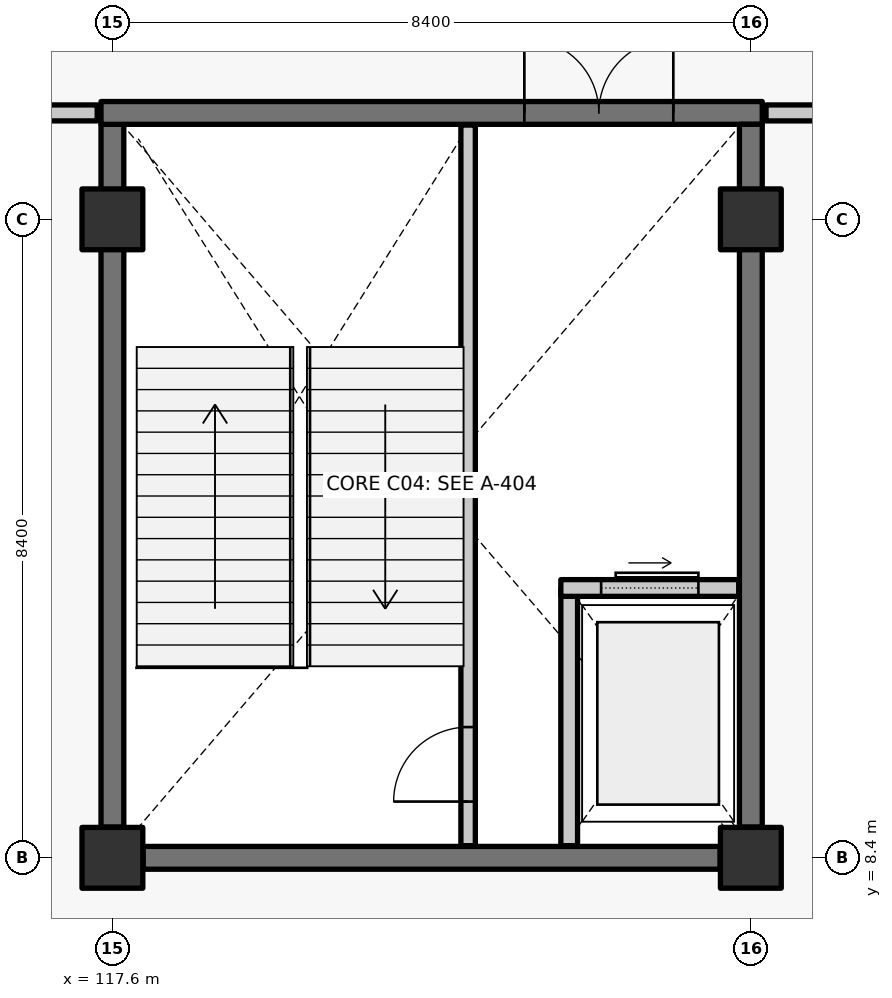
"""IFC4 building model, lengths in metres.
Left out: names, types, materials, properties, quantities, classifications, styles, units other than length and angle.
Written with IfcOpenShell. Run it as: python <this file> out.ifc"""

import sys

from ifc_helpers import new_model, si_unit, direction, frame, frame_2d, origin, origin_2d, place, context, subcontext, project, spatial, rectangle, extrude, element, fill, save


model = new_model("IFC4")
c1 = context("Model", 3, precision=1e-05, world=origin(), true_north=direction((0.0, 1.0)))
c2 = subcontext(c1, "Body", "Model", "MODEL_VIEW")
j1 = project(units=[si_unit("LENGTHUNIT", "METRE"), si_unit("PLANEANGLEUNIT", "RADIAN")], contexts=[c1])
p1 = place(None, origin())
s1 = spatial("IfcSite", under=j1, at=p1, CompositionType="ELEMENT")
p2 = place(p1, origin())
s2 = spatial("IfcBuilding", under=s1, at=p2, CompositionType="ELEMENT")
p3 = place(p2, frame((0.0, 0.0, 6.0)))
s3 = spatial("IfcBuildingStorey", under=s2, at=p3, CompositionType="ELEMENT", Elevation=6.0)
for number, where, z_axis, x_axis in (
    (1, (117.6, 8.4, 0.0), (0.0, 0.0, 1.0), (1.0, 0.0, 0.0)),
    (2, (117.6, 16.8, 0.0), (0.0, 0.0, 1.0), (1.0, 0.0, 0.0)),
    (3, (126.0, 8.4, 0.0), (0.0, 0.0, 1.0), (1.0, 0.0, 0.0)),
    (4, (126.0, 16.8, 0.0), (0.0, 0.0, 1.0), (1.0, 0.0, 0.0)),
):
    element("IfcColumn", number, at=place(p3, frame(where, z_axis=z_axis, x_axis=x_axis)), inside=s3, PredefinedType="COLUMN", context=c2, shape_type="SweptSolid", body=[
        extrude(rectangle(XDim=0.8, YDim=0.8, at=origin_2d()), origin(), (0.0, 0.0, 1.0), 5.4),
    ])
p4 = place(p3, frame((125.595, 8.4, 0.0), z_axis=(0.0, 0.0, 1.0), x_axis=(-1.0, 0.0, 0.0)))
e5 = element("IfcWall", 5, at=p4, inside=s3, PredefinedType="SHEAR", context=c2, shape_type="SweptSolid", body=[
    extrude(rectangle(XDim=7.59, YDim=0.3, at=frame_2d((3.795, 0.0))), origin(), (0.0, 0.0, 1.0), 5.12),
])
p5 = place(p3, frame((117.6, 8.805, 0.0), z_axis=(0.0, 0.0, 1.0), x_axis=(0.0, 1.0, 0.0)))
e6 = element("IfcWall", 6, at=p5, inside=s3, PredefinedType="SHEAR", context=c2, shape_type="SweptSolid", body=[
    extrude(rectangle(XDim=9.245, YDim=0.3, at=frame_2d((4.623, 0.0))), origin(), (0.0, 0.0, 1.0), 5.12),
])
p6 = place(p3, frame((117.45, 18.2, 0.0), z_axis=(0.0, 0.0, 1.0), x_axis=(1.0, 0.0, 0.0)))
e7 = element("IfcWall", 7, at=p6, inside=s3, PredefinedType="SHEAR", context=c2, shape_type="SweptSolid", body=[
    extrude(rectangle(XDim=8.7, YDim=0.3, at=frame_2d((4.35, 0.0))), origin(), (0.0, 0.0, 1.0), 5.12),
])
p7 = place(p6, frame((5.57, 0.0, 0.0)))
e8 = element("IfcOpeningElement", 8, at=p7, cuts=e7, PredefinedType="OPENING", context=c2, shape_type="SweptSolid", body=[
    extrude(rectangle(XDim=1.96, YDim=2.2, at=frame_2d((0.98, 1.1))), frame((0.0, 0.16, 0.0), z_axis=(0.0, -1.0, 0.0), x_axis=(1.0, 0.0, 0.0)), (0.0, 0.0, 1.0), 0.32),
])
p8 = place(p3, frame((126.0, 18.05, 0.0), z_axis=(0.0, 0.0, 1.0), x_axis=(0.0, -1.0, 0.0)))
e9 = element("IfcWall", 9, at=p8, inside=s3, PredefinedType="SHEAR", context=c2, shape_type="SweptSolid", body=[
    extrude(rectangle(XDim=9.245, YDim=0.3, at=frame_2d((4.623, 0.0))), origin(), (0.0, 0.0, 1.0), 5.12),
])
p9 = place(p3, frame((122.28, 8.56, 0.0), z_axis=(0.0, 0.0, 1.0), x_axis=(0.0, 1.0, 0.0)))
e10 = element("IfcWall", 10, at=p9, inside=s3, PredefinedType="SOLIDWALL", context=c2, shape_type="SweptSolid", body=[
    extrude(rectangle(XDim=9.48, YDim=0.19, at=frame_2d((4.74, 0.0))), origin(), (0.0, 0.0, 1.0), 5.12),
])
p10 = place(p9, frame((0.58, 0.0, 0.0)))
e11 = element("IfcOpeningElement", 11, at=p10, cuts=e10, PredefinedType="OPENING", context=c2, shape_type="SweptSolid", body=[
    extrude(rectangle(XDim=0.98, YDim=2.15, at=frame_2d((0.49, 1.075))), frame((0.0, 0.105, 0.0), z_axis=(0.0, -1.0, 0.0), x_axis=(1.0, 0.0, 0.0)), (0.0, 0.0, 1.0), 0.21),
])
p11 = place(p3, frame((123.61, 8.56, 0.0), z_axis=(0.0, 0.0, 1.0), x_axis=(0.0, 1.0, 0.0)))
e12 = element("IfcWall", 12, at=p11, inside=s3, PredefinedType="SOLIDWALL", context=c2, shape_type="SweptSolid", body=[
    extrude(rectangle(XDim=3.39, YDim=0.22, at=frame_2d((1.695, 0.0))), origin(), (0.0, 0.0, 1.0), 5.12),
])
p12 = place(p3, frame((123.5, 11.95, 0.0), z_axis=(0.0, 0.0, 1.0), x_axis=(1.0, 0.0, 0.0)))
e13 = element("IfcWall", 13, at=p12, inside=s3, PredefinedType="SOLIDWALL", context=c2, shape_type="SweptSolid", body=[
    extrude(rectangle(XDim=2.34, YDim=0.22, at=frame_2d((1.17, 0.0))), origin(), (0.0, 0.0, 1.0), 5.12),
])
p13 = place(p12, frame((0.53, 0.0, 0.0)))
e14 = element("IfcOpeningElement", 14, at=p13, cuts=e13, PredefinedType="OPENING", context=c2, shape_type="SweptSolid", body=[
    extrude(rectangle(XDim=1.28, YDim=2.25, at=frame_2d((0.64, 1.125))), frame((0.0, 0.12, 0.0), z_axis=(0.0, -1.0, 0.0), x_axis=(1.0, 0.0, 0.0)), (0.0, 0.0, 1.0), 0.24),
])
p14 = place(p3, frame((101.0, 18.2, 0.0), z_axis=(0.0, 0.0, 1.0), x_axis=(1.0, 0.0, 0.0)))
e15 = element("IfcWall", 15, at=p14, inside=s3, PredefinedType="PARTITIONING", context=c2, shape_type="SweptSolid", body=[
    extrude(rectangle(XDim=16.4, YDim=0.21, at=frame_2d((8.2, 0.0))), origin(), (0.0, 0.0, 1.0), 5.12),
])
p15 = place(p14, frame((3.3, 0.0, 0.0)))
e16 = element("IfcOpeningElement", 16, at=p15, cuts=e15, PredefinedType="OPENING", context=c2, shape_type="SweptSolid", body=[
    extrude(rectangle(XDim=1.4, YDim=2.2, at=frame_2d((0.7, 1.1))), frame((0.0, 0.115, 0.0), z_axis=(0.0, -1.0, 0.0), x_axis=(1.0, 0.0, 0.0)), (0.0, 0.0, 1.0), 0.23),
])
p16 = place(p14, frame((11.7, 0.0, 0.0)))
e17 = element("IfcOpeningElement", 17, at=p16, cuts=e15, PredefinedType="OPENING", context=c2, shape_type="SweptSolid", body=[
    extrude(rectangle(XDim=1.4, YDim=2.2, at=frame_2d((0.7, 1.1))), frame((0.0, 0.115, 0.0), z_axis=(0.0, -1.0, 0.0), x_axis=(1.0, 0.0, 0.0)), (0.0, 0.0, 1.0), 0.23),
])
p17 = place(p3, frame((126.2, 18.2, 0.0), z_axis=(0.0, 0.0, 1.0), x_axis=(1.0, 0.0, 0.0)))
e18 = element("IfcWall", 18, at=p17, inside=s3, PredefinedType="PARTITIONING", context=c2, shape_type="SweptSolid", body=[
    extrude(rectangle(XDim=16.4, YDim=0.21, at=frame_2d((8.2, 0.0))), origin(), (0.0, 0.0, 1.0), 5.12),
])
p18 = place(p17, frame((3.5, 0.0, 0.0)))
e19 = element("IfcOpeningElement", 19, at=p18, cuts=e18, PredefinedType="OPENING", context=c2, shape_type="SweptSolid", body=[
    extrude(rectangle(XDim=1.0, YDim=2.15, at=frame_2d((0.5, 1.075))), frame((0.0, 0.115, 0.0), z_axis=(0.0, -1.0, 0.0), x_axis=(1.0, 0.0, 0.0)), (0.0, 0.0, 1.0), 0.23),
])
p19 = place(p17, frame((11.9, 0.0, 0.0)))
e20 = element("IfcOpeningElement", 20, at=p19, cuts=e18, PredefinedType="OPENING", context=c2, shape_type="SweptSolid", body=[
    extrude(rectangle(XDim=1.0, YDim=2.15, at=frame_2d((0.5, 1.075))), frame((0.0, 0.115, 0.0), z_axis=(0.0, -1.0, 0.0), x_axis=(1.0, 0.0, 0.0)), (0.0, 0.0, 1.0), 0.23),
])
p20 = place(p10, origin())
e21 = element("IfcDoor", 21, at=p20, inside=s3, OperationType="SINGLE_SWING_LEFT", PredefinedType="DOOR", context=c2, shape_type="SweptSolid", body=[
    extrude(rectangle(XDim=0.98, YDim=2.15, at=frame_2d((0.49, 1.075))), frame((0.0, 0.025, 0.0), z_axis=(0.0, -1.0, 0.0), x_axis=(1.0, 0.0, 0.0)), (0.0, 0.0, 1.0), 0.05),
])
fill(e11, e21)
p21 = place(p7, origin())
e22 = element("IfcDoor", 22, at=p21, inside=s3, OperationType="DOUBLE_DOOR_SINGLE_SWING", PredefinedType="DOOR", context=c2, shape_type="SweptSolid", body=[
    extrude(rectangle(XDim=1.96, YDim=2.2, at=frame_2d((0.98, 1.1))), frame((0.0, 0.025, 0.0), z_axis=(0.0, -1.0, 0.0), x_axis=(1.0, 0.0, 0.0)), (0.0, 0.0, 1.0), 0.05),
])
fill(e8, e22)
p22 = place(p13, origin())
e23 = element("IfcDoor", 23, at=p22, inside=s3, OperationType="SLIDING_TO_RIGHT", PredefinedType="DOOR", context=c2, shape_type="SweptSolid", body=[
    extrude(rectangle(XDim=1.28, YDim=2.25, at=frame_2d((0.64, 1.125))), frame((0.0, 0.025, 0.0), z_axis=(0.0, -1.0, 0.0), x_axis=(1.0, 0.0, 0.0)), (0.0, 0.0, 1.0), 0.05),
])
fill(e14, e23)
save(model, sys.argv[1])
